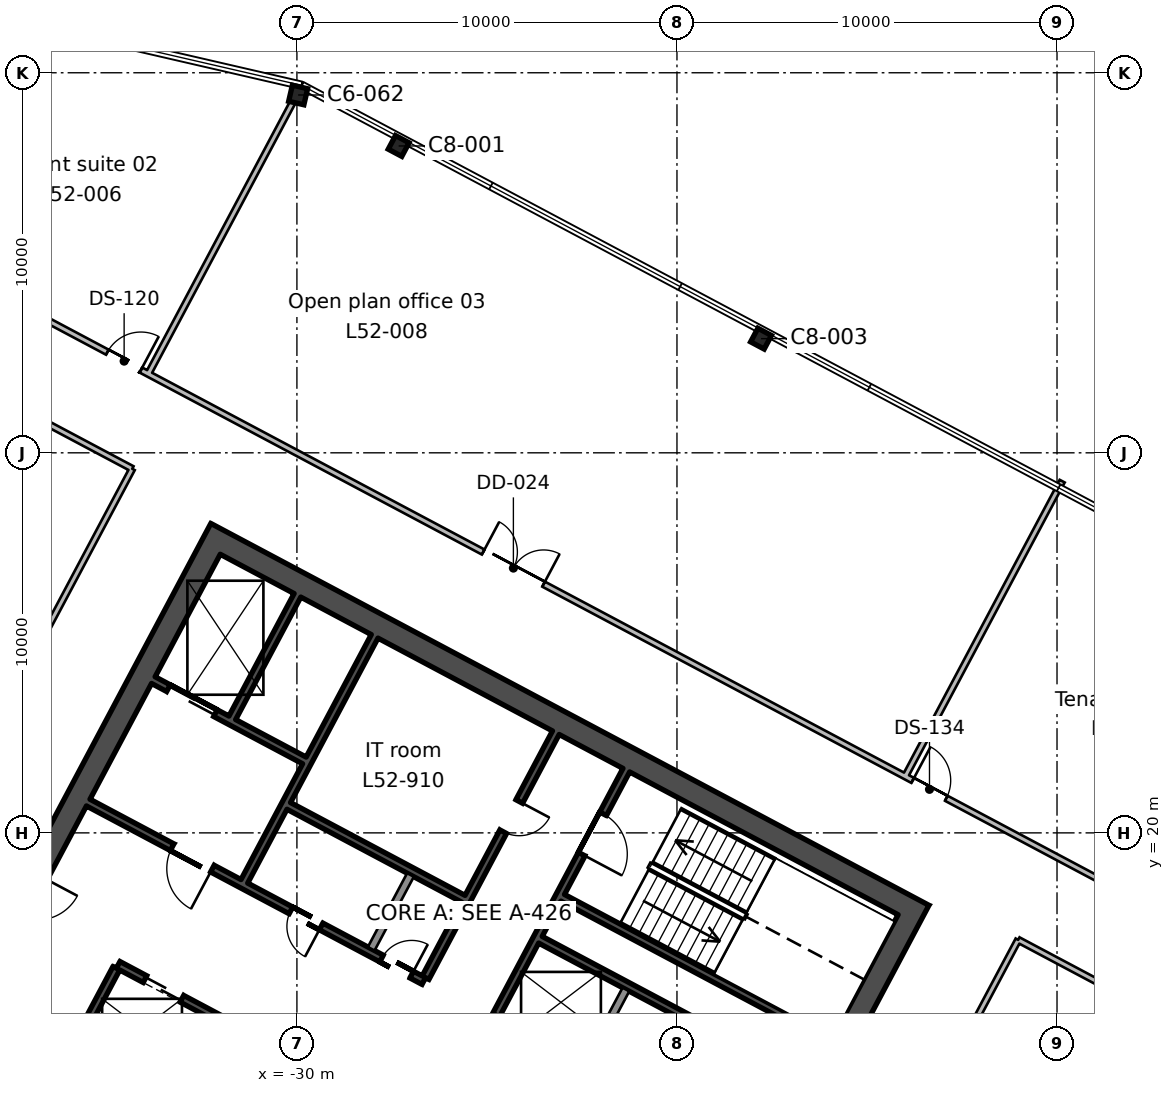
"""IFC4 building model, lengths in metres.
Left out: names, types, materials, properties, quantities, classifications, styles, units other than length and angle.
Written with IfcOpenShell. Run it as: python <this file> out.ifc"""

import sys

from ifc_helpers import new_model, si_unit, direction, frame, frame_2d, origin, origin_2d, place, context, subcontext, project, spatial, rectangle, i_section, extrude, element, fill, save


model = new_model("IFC4")
c1 = context("Model", 3, precision=1e-05, world=origin(), true_north=direction((0.0, 1.0)))
c2 = subcontext(c1, "Body", "Model", "MODEL_VIEW")
j1 = project(units=[si_unit("LENGTHUNIT", "METRE"), si_unit("PLANEANGLEUNIT", "RADIAN")], contexts=[c1])
p1 = place(None, origin())
s1 = spatial("IfcSite", under=j1, at=p1, CompositionType="ELEMENT")
p2 = place(p1, origin())
s2 = spatial("IfcBuilding", under=s1, at=p2, CompositionType="ELEMENT")
p3 = place(p2, frame((0.0, 0.0, 236.4)))
s3 = spatial("IfcBuildingStorey", under=s2, at=p3, CompositionType="ELEMENT", Elevation=236.4)
for number, where, z_axis, x_axis in (
    (1, (-17.788, 33.004, 0.0), (0.0, 0.0, 1.0), (-0.883, 0.469, 0.0)),
    (2, (-27.323, 38.074, 0.0), (0.0, 0.0, 1.0), (-0.883, 0.469, 0.0)),
):
    element("IfcColumn", number, at=place(p3, frame(where, z_axis=z_axis, x_axis=x_axis)), inside=s3, PredefinedType="COLUMN", context=c2, shape_type="SweptSolid", body=[
        extrude(i_section(OverallWidth=0.404, OverallDepth=0.406, WebThickness=0.027, FlangeThickness=0.044, FilletRadius=0.015, at=origin_2d()), origin(), (0.0, 0.0, 1.0), 3.9),
    ])
p4 = place(p3, frame((-29.968, 39.415, 0.0), z_axis=(0.0, 0.0, 1.0), x_axis=(-0.974370064785, 0.224951054344, 0.0)))
e3 = element("IfcColumn", 3, at=p4, inside=s3, PredefinedType="COLUMN", context=c2, shape_type="SweptSolid", body=[
    extrude(i_section(OverallWidth=0.412, OverallDepth=0.434, WebThickness=0.036, FlangeThickness=0.057, FilletRadius=0.015, at=origin_2d()), origin(), (0.0, 0.0, 1.0), 3.9),
])
p5 = place(p3, frame((-13.635, 18.236, 0.0), z_axis=(0.0, 0.0, 1.0), x_axis=(-0.469478769487, -0.88294376095, 0.0)))
e4 = element("IfcWall", 4, at=p5, inside=s3, PredefinedType="SHEAR", context=c2, shape_type="SweptSolid", body=[
    extrude(rectangle(XDim=19.4, YDim=0.6, at=frame_2d((9.7, 0.0))), origin(), (0.0, 0.0, 1.0), 3.9),
])
p6 = place(p5, frame((6.7, 0.0, 0.0)))
e5 = element("IfcOpeningElement", 5, at=p6, cuts=e4, PredefinedType="OPENING", context=c2, shape_type="SweptSolid", body=[
    extrude(rectangle(XDim=2.4, YDim=2.4, at=frame_2d((1.2, 1.2))), frame((0.0, 0.31, 0.0), z_axis=(0.0, -1.0, 0.0), x_axis=(1.0, 0.0, 0.0)), (0.0, 0.0, 1.0), 0.62),
])
p7 = place(p3, frame((-32.0, 28.001, 0.0), z_axis=(0.0, 0.0, 1.0), x_axis=(-0.469468958625, -0.882948977511, 0.0)))
e6 = element("IfcWall", 6, at=p7, inside=s3, PredefinedType="SHEAR", context=c2, shape_type="SweptSolid", body=[
    extrude(rectangle(XDim=19.4, YDim=0.6, at=frame_2d((9.7, 0.0))), origin(), (0.0, 0.0, 1.0), 3.9),
])
p8 = place(p7, frame((10.3, 0.0, 0.0)))
e7 = element("IfcOpeningElement", 7, at=p8, cuts=e6, PredefinedType="OPENING", context=c2, shape_type="SweptSolid", body=[
    extrude(rectangle(XDim=2.4, YDim=2.4, at=frame_2d((1.2, 1.2))), frame((0.0, 0.31, 0.0), z_axis=(0.0, -1.0, 0.0), x_axis=(1.0, 0.0, 0.0)), (0.0, 0.0, 1.0), 0.62),
])
p9 = place(p3, frame((-14.041, 18.112, 0.0), z_axis=(0.0, 0.0, 1.0), x_axis=(-0.882947755831, 0.46947125628, 0.0)))
e8 = element("IfcWall", 8, at=p9, inside=s3, PredefinedType="SHEAR", context=c2, shape_type="SweptSolid", body=[
    extrude(rectangle(XDim=20.2, YDim=0.6, at=frame_2d((10.1, 0.0))), origin(), (0.0, 0.0, 1.0), 3.9),
])
p10 = place(p3, frame((-21.344, 15.879, 0.0), z_axis=(0.0, 0.0, 1.0), x_axis=(-0.4694473164, -0.882960484464, 0.0)))
e9 = element("IfcWall", 9, at=p10, inside=s3, PredefinedType="SOLIDWALL", context=c2, shape_type="SweptSolid", body=[
    extrude(rectangle(XDim=2.2, YDim=0.2, at=frame_2d((1.1, 0.0))), origin(), (0.0, 0.0, 1.0), 3.9),
])
p11 = place(p3, frame((-21.333, 21.649, 0.0), z_axis=(0.0, 0.0, 1.0), x_axis=(-0.469494272526, -0.882935517501, 0.0)))
e10 = element("IfcWall", 10, at=p11, inside=s3, PredefinedType="SHEAR", context=c2, shape_type="SweptSolid", body=[
    extrude(rectangle(XDim=7.3, YDim=0.2, at=frame_2d((3.65, 0.0))), origin(), (0.0, 0.0, 1.0), 3.9),
])
p12 = place(p11, frame((1.3, 0.0, 0.0)))
e11 = element("IfcOpeningElement", 11, at=p12, cuts=e10, PredefinedType="OPENING", context=c2, shape_type="SweptSolid", body=[
    extrude(rectangle(XDim=1.2, YDim=2.1, at=frame_2d((0.6, 1.05))), frame((0.0, 0.11, 0.0), z_axis=(0.0, -1.0, 0.0), x_axis=(1.0, 0.0, 0.0)), (0.0, 0.0, 1.0), 0.22),
])
p13 = place(p3, frame((-23.188, 22.635, 0.0), z_axis=(0.0, 0.0, 1.0), x_axis=(-0.469454336211, -0.882956752176, 0.0)))
e12 = element("IfcWall", 12, at=p13, inside=s3, PredefinedType="SHEAR", context=c2, shape_type="SweptSolid", body=[
    extrude(rectangle(XDim=7.3, YDim=0.2, at=frame_2d((3.65, 0.0))), origin(), (0.0, 0.0, 1.0), 3.9),
])
p14 = place(p13, frame((2.05, 0.0, 0.0)))
e13 = element("IfcOpeningElement", 13, at=p14, cuts=e12, PredefinedType="OPENING", context=c2, shape_type="SweptSolid", body=[
    extrude(rectangle(XDim=0.9, YDim=2.1, at=frame_2d((0.45, 1.05))), frame((0.0, 0.11, 0.0), z_axis=(0.0, -1.0, 0.0), x_axis=(1.0, 0.0, 0.0)), (0.0, 0.0, 1.0), 0.22),
])
p15 = place(p3, frame((-27.012, 18.893, 0.0), z_axis=(0.0, 0.0, 1.0), x_axis=(-0.4694473164, -0.882960484464, 0.0)))
e14 = element("IfcWall", 14, at=p15, inside=s3, PredefinedType="SOLIDWALL", context=c2, shape_type="SweptSolid", body=[
    extrude(rectangle(XDim=2.2, YDim=0.2, at=frame_2d((1.1, 0.0))), origin(), (0.0, 0.0, 1.0), 3.9),
])
p16 = place(p3, frame((-27.955, 25.171, 0.0), z_axis=(0.0, 0.0, 1.0), x_axis=(-0.469480409012, -0.88294288918, 0.0)))
e15 = element("IfcWall", 15, at=p16, inside=s3, PredefinedType="SHEAR", context=c2, shape_type="SweptSolid", body=[
    extrude(rectangle(XDim=7.3, YDim=0.2, at=frame_2d((3.65, 0.0))), origin(), (0.0, 0.0, 1.0), 3.9),
])
p17 = place(p3, frame((-34.75, 16.438, 0.0), z_axis=(0.0, 0.0, 1.0), x_axis=(-0.469401318492, -0.882984938828, 0.0)))
e16 = element("IfcWall", 16, at=p17, inside=s3, PredefinedType="SHEAR", context=c2, shape_type="SweptSolid", body=[
    extrude(rectangle(XDim=2.2, YDim=0.2, at=frame_2d((1.1, 0.0))), origin(), (0.0, 0.0, 1.0), 3.9),
])
p18 = place(p3, frame((-29.986, 26.25, 0.0), z_axis=(0.0, 0.0, 1.0), x_axis=(-0.469494272526, -0.882935517501, 0.0)))
e17 = element("IfcWall", 17, at=p18, inside=s3, PredefinedType="SHEAR", context=c2, shape_type="SweptSolid", body=[
    extrude(rectangle(XDim=3.65, YDim=0.2, at=frame_2d((1.825, 0.0))), origin(), (0.0, 0.0, 1.0), 3.9),
])
p19 = place(p3, frame((-15.942, 14.536, 0.0), z_axis=(0.0, 0.0, 1.0), x_axis=(-0.882946947542, 0.469472776449, 0.0)))
e18 = element("IfcWall", 18, at=p19, inside=s3, PredefinedType="SHEAR", context=c2, shape_type="SweptSolid", body=[
    extrude(rectangle(XDim=8.0, YDim=0.2, at=frame_2d((4.0, 0.0))), origin(), (0.0, 0.0, 1.0), 3.9),
])
p20 = place(p3, frame((-29.804, 21.906, 0.0), z_axis=(0.0, 0.0, 1.0), x_axis=(-0.882960433586, 0.469447412093, 0.0)))
e19 = element("IfcWall", 19, at=p20, inside=s3, PredefinedType="SHEAR", context=c2, shape_type="SweptSolid", body=[
    extrude(rectangle(XDim=4.5, YDim=0.2, at=frame_2d((2.25, 0.0))), origin(), (0.0, 0.0, 1.0), 3.9),
])
p21 = place(p20, frame((2.65, 0.0, 0.0)))
e20 = element("IfcOpeningElement", 20, at=p21, cuts=e19, PredefinedType="OPENING", context=c2, shape_type="SweptSolid", body=[
    extrude(rectangle(XDim=1.4, YDim=2.4, at=frame_2d((0.7, 1.2))), frame((0.0, 0.11, 0.0), z_axis=(0.0, -1.0, 0.0), x_axis=(1.0, 0.0, 0.0)), (0.0, 0.0, 1.0), 0.22),
])
p22 = place(p3, frame((-16.529, 13.432, 0.0), z_axis=(0.0, 0.0, 1.0), x_axis=(-0.88295287151, 0.469461634952, 0.0)))
e21 = element("IfcWall", 21, at=p22, inside=s3, PredefinedType="SHEAR", context=c2, shape_type="SweptSolid", body=[
    extrude(rectangle(XDim=8.0, YDim=0.2, at=frame_2d((4.0, 0.0))), origin(), (0.0, 0.0, 1.0), 3.9),
])
p23 = place(p3, frame((-25.623, 18.268, 0.0), z_axis=(0.0, 0.0, 1.0), x_axis=(-0.882953967957, 0.469459572775, 0.0)))
e22 = element("IfcWall", 22, at=p23, inside=s3, PredefinedType="SHEAR", context=c2, shape_type="SweptSolid", body=[
    extrude(rectangle(XDim=5.2, YDim=0.2, at=frame_2d((2.6, 0.0))), origin(), (0.0, 0.0, 1.0), 3.9),
])
p24 = place(p3, frame((-26.662, 16.102, 0.0), z_axis=(0.0, 0.0, 1.0), x_axis=(-0.882940221191, 0.469485426614, 0.0)))
e23 = element("IfcWall", 23, at=p24, inside=s3, PredefinedType="SHEAR", context=c2, shape_type="SweptSolid", body=[
    extrude(rectangle(XDim=10.0, YDim=0.2, at=frame_2d((5.0, 0.0))), origin(), (0.0, 0.0, 1.0), 3.9),
])
p25 = place(p24, frame((6.3, 0.0, 0.0)))
e24 = element("IfcOpeningElement", 24, at=p25, cuts=e23, PredefinedType="OPENING", context=c2, shape_type="SweptSolid", body=[
    extrude(rectangle(XDim=1.2, YDim=2.1, at=frame_2d((0.6, 1.05))), frame((0.0, 0.11, 0.0), z_axis=(0.0, -1.0, 0.0), x_axis=(1.0, 0.0, 0.0)), (0.0, 0.0, 1.0), 0.22),
])
p26 = place(p24, frame((0.36, 0.0, 0.0)))
e25 = element("IfcOpeningElement", 25, at=p26, cuts=e23, PredefinedType="OPENING", context=c2, shape_type="SweptSolid", body=[
    extrude(rectangle(XDim=0.9, YDim=2.1, at=frame_2d((0.45, 1.05))), frame((0.0, 0.11, 0.0), z_axis=(0.0, -1.0, 0.0), x_axis=(1.0, 0.0, 0.0)), (0.0, 0.0, 1.0), 0.22),
])
p27 = place(p24, frame((3.06, 0.0, 0.0)))
e26 = element("IfcOpeningElement", 26, at=p27, cuts=e23, PredefinedType="OPENING", context=c2, shape_type="SweptSolid", body=[
    extrude(rectangle(XDim=0.9, YDim=2.1, at=frame_2d((0.45, 1.05))), frame((0.0, 0.11, 0.0), z_axis=(0.0, -1.0, 0.0), x_axis=(1.0, 0.0, 0.0)), (0.0, 0.0, 1.0), 0.22),
])
p28 = place(p3, frame((-29.935, 13.991, 0.0), z_axis=(0.0, 0.0, 1.0), x_axis=(-0.882952937579, 0.469461510692, 0.0)))
e27 = element("IfcWall", 27, at=p28, inside=s3, PredefinedType="SHEAR", context=c2, shape_type="SweptSolid", body=[
    extrude(rectangle(XDim=5.4, YDim=0.2, at=frame_2d((2.7, 0.0))), origin(), (0.0, 0.0, 1.0), 3.9),
])
p29 = place(p28, frame((0.8, 0.0, 0.0)))
e28 = element("IfcOpeningElement", 28, at=p29, cuts=e27, PredefinedType="OPENING", context=c2, shape_type="SweptSolid", body=[
    extrude(rectangle(XDim=1.1, YDim=2.1, at=frame_2d((0.55, 1.05))), frame((0.0, 0.11, 0.0), z_axis=(0.0, -1.0, 0.0), x_axis=(1.0, 0.0, 0.0)), (0.0, 0.0, 1.0), 0.22),
])
p30 = place(p28, frame((3.5, 0.0, 0.0)))
e29 = element("IfcOpeningElement", 29, at=p30, cuts=e27, PredefinedType="OPENING", context=c2, shape_type="SweptSolid", body=[
    extrude(rectangle(XDim=1.1, YDim=2.1, at=frame_2d((0.55, 1.05))), frame((0.0, 0.11, 0.0), z_axis=(0.0, -1.0, 0.0), x_axis=(1.0, 0.0, 0.0)), (0.0, 0.0, 1.0), 0.22),
])
p31 = place(p3, frame((-31.15, 11.919, 0.0), z_axis=(0.0, 0.0, 1.0), x_axis=(-0.882940221191, 0.469485426614, 0.0)))
e30 = element("IfcWall", 30, at=p31, inside=s3, PredefinedType="SHEAR", context=c2, shape_type="SweptSolid", body=[
    extrude(rectangle(XDim=8.0, YDim=0.2, at=frame_2d((4.0, 0.0))), origin(), (0.0, 0.0, 1.0), 3.9),
])
p32 = place(p3, frame((-40.0, 28.808, 0.0), z_axis=(0.0, 0.0, 1.0), x_axis=(0.731313661346, -0.682041295471, 0.0)))
e31 = element("IfcWall", 31, at=p32, inside=s3, PredefinedType="PARTITIONING", context=c2, shape_type="SweptSolid", body=[
    extrude(rectangle(XDim=4.806, YDim=0.15, at=frame_2d((2.403, 0.0))), origin(), (0.0, 0.0, 1.0), 3.54),
])
p33 = place(p3, frame((-41.769, 15.592, 0.0), z_axis=(0.0, 0.0, 1.0), x_axis=(0.469444027343, 0.882962233163, 0.0)))
e32 = element("IfcWall", 32, at=p33, inside=s3, PredefinedType="PARTITIONING", context=c2, shape_type="SweptSolid", body=[
    extrude(rectangle(XDim=15.842, YDim=0.15, at=frame_2d((7.921, 0.0))), origin(), (0.0, 0.0, 1.0), 3.54),
])
p34 = place(p33, frame((7.05, 0.0, 0.0)))
e33 = element("IfcOpeningElement", 33, at=p34, cuts=e32, PredefinedType="OPENING", context=c2, shape_type="SweptSolid", body=[
    extrude(rectangle(XDim=1.8, YDim=2.1, at=frame_2d((0.9, 1.05))), frame((0.0, 0.085, 0.0), z_axis=(0.0, -1.0, 0.0), x_axis=(1.0, 0.0, 0.0)), (0.0, 0.0, 1.0), 0.17),
])
p35 = place(p3, frame((-34.332, 29.58, 0.0), z_axis=(0.0, 0.0, 1.0), x_axis=(-0.882939350293, 0.46948706447, 0.0)))
e34 = element("IfcWall", 34, at=p35, inside=s3, PredefinedType="PARTITIONING", context=c2, shape_type="SweptSolid", body=[
    extrude(rectangle(XDim=19.327, YDim=0.15, at=frame_2d((9.664, 0.0))), origin(), (0.0, 0.0, 1.0), 3.54),
])
p36 = place(p3, frame((-48.541, 39.854, 0.0), z_axis=(0.0, 0.0, 1.0), x_axis=(0.882945008423, -0.469476423372, 0.0)))
e35 = element("IfcWall", 35, at=p36, inside=s3, PredefinedType="PARTITIONING", context=c2, shape_type="SweptSolid", body=[
    extrude(rectangle(XDim=54.976, YDim=0.15, at=frame_2d((27.488, 0.0))), origin(), (0.0, 0.0, 1.0), 3.54),
])
p37 = place(p36, frame((39.35, 0.0, 0.0)))
e36 = element("IfcOpeningElement", 36, at=p37, cuts=e35, PredefinedType="OPENING", context=c2, shape_type="SweptSolid", body=[
    extrude(rectangle(XDim=1.0, YDim=2.1, at=frame_2d((0.5, 1.05))), frame((0.0, 0.085, 0.0), z_axis=(0.0, -1.0, 0.0), x_axis=(1.0, 0.0, 0.0)), (0.0, 0.0, 1.0), 0.17),
])
p38 = place(p36, frame((26.55, 0.0, 0.0)))
e37 = element("IfcOpeningElement", 37, at=p38, cuts=e35, PredefinedType="OPENING", context=c2, shape_type="SweptSolid", body=[
    extrude(rectangle(XDim=1.8, YDim=2.1, at=frame_2d((0.9, 1.05))), frame((0.0, 0.085, 0.0), z_axis=(0.0, -1.0, 0.0), x_axis=(1.0, 0.0, 0.0)), (0.0, 0.0, 1.0), 0.17),
])
p39 = place(p36, frame((15.35, 0.0, 0.0)))
e38 = element("IfcOpeningElement", 38, at=p39, cuts=e35, PredefinedType="OPENING", context=c2, shape_type="SweptSolid", body=[
    extrude(rectangle(XDim=1.0, YDim=2.1, at=frame_2d((0.5, 1.05))), frame((0.0, 0.085, 0.0), z_axis=(0.0, -1.0, 0.0), x_axis=(1.0, 0.0, 0.0)), (0.0, 0.0, 1.0), 0.17),
])
p40 = place(p3, frame((-30.109, 39.225, 0.0), z_axis=(0.0, 0.0, 1.0), x_axis=(-0.469490973279, -0.882937271843, 0.0)))
e39 = element("IfcWall", 39, at=p40, inside=s3, PredefinedType="PARTITIONING", context=c2, shape_type="SweptSolid", body=[
    extrude(rectangle(XDim=8.098, YDim=0.15, at=frame_2d((4.049, 0.0))), origin(), (0.0, 0.0, 1.0), 3.54),
])
p41 = place(p3, frame((-9.864, 29.255, 0.0), z_axis=(0.0, 0.0, 1.0), x_axis=(-0.469457446168, -0.882955098653, 0.0)))
e40 = element("IfcWall", 40, at=p41, inside=s3, PredefinedType="PARTITIONING", context=c2, shape_type="SweptSolid", body=[
    extrude(rectangle(XDim=8.8, YDim=0.15, at=frame_2d((4.4, 0.0))), origin(), (0.0, 0.0, 1.0), 3.54),
])
p42 = place(p3, frame((-20.411, -0.473, 0.0), z_axis=(0.0, 0.0, 1.0), x_axis=(0.469451816494, 0.882958091865, 0.0)))
e41 = element("IfcWall", 41, at=p42, inside=s3, PredefinedType="PARTITIONING", context=c2, shape_type="SweptSolid", body=[
    extrude(rectangle(XDim=20.0, YDim=0.15, at=frame_2d((10.0, 0.0))), origin(), (0.0, 0.0, 1.0), 3.54),
])
p43 = place(p42, frame((9.45, 0.0, 0.0)))
e42 = element("IfcOpeningElement", 42, at=p43, cuts=e41, PredefinedType="OPENING", context=c2, shape_type="SweptSolid", body=[
    extrude(rectangle(XDim=1.0, YDim=2.1, at=frame_2d((0.5, 1.05))), frame((0.0, 0.085, 0.0), z_axis=(0.0, -1.0, 0.0), x_axis=(1.0, 0.0, 0.0)), (0.0, 0.0, 1.0), 0.17),
])
p44 = place(p3, frame((-11.022, 17.186, 0.0), z_axis=(0.0, 0.0, 1.0), x_axis=(0.882967947403, -0.469433279453, 0.0)))
e43 = element("IfcWall", 43, at=p44, inside=s3, PredefinedType="PARTITIONING", context=c2, shape_type="SweptSolid", body=[
    extrude(rectangle(XDim=7.639, YDim=0.15, at=frame_2d((3.819, 0.0))), origin(), (0.0, 0.0, 1.0), 3.54),
])
p45 = place(p25, origin())
e44 = element("IfcDoor", 44, at=p45, inside=s3, OperationType="SINGLE_SWING_LEFT", PredefinedType="DOOR", context=c2, shape_type="SweptSolid", body=[
    extrude(rectangle(XDim=1.2, YDim=2.1, at=frame_2d((0.6, 1.05))), frame((0.0, 0.025, 0.0), z_axis=(0.0, -1.0, 0.0), x_axis=(1.0, 0.0, 0.0)), (0.0, 0.0, 1.0), 0.05),
])
fill(e24, e44)
p46 = place(p12, origin())
e45 = element("IfcDoor", 45, at=p46, inside=s3, OperationType="SINGLE_SWING_RIGHT", PredefinedType="DOOR", context=c2, shape_type="SweptSolid", body=[
    extrude(rectangle(XDim=1.2, YDim=2.1, at=frame_2d((0.6, 1.05))), frame((0.0, 0.025, 0.0), z_axis=(0.0, -1.0, 0.0), x_axis=(1.0, 0.0, 0.0)), (0.0, 0.0, 1.0), 0.05),
])
fill(e11, e45)
p47 = place(p26, frame((0.9, 0.0, 0.0), z_axis=(0.0, 0.0, 1.0), x_axis=(-1.0, 0.0, 0.0)))
e46 = element("IfcDoor", 46, at=p47, inside=s3, OperationType="SINGLE_SWING_RIGHT", PredefinedType="DOOR", context=c2, shape_type="SweptSolid", body=[
    extrude(rectangle(XDim=0.9, YDim=2.1, at=frame_2d((0.45, 1.05))), frame((0.0, 0.025, 0.0), z_axis=(0.0, -1.0, 0.0), x_axis=(1.0, 0.0, 0.0)), (0.0, 0.0, 1.0), 0.05),
])
fill(e25, e46)
p48 = place(p27, origin())
e47 = element("IfcDoor", 47, at=p48, inside=s3, OperationType="SINGLE_SWING_LEFT", PredefinedType="DOOR", context=c2, shape_type="SweptSolid", body=[
    extrude(rectangle(XDim=0.9, YDim=2.1, at=frame_2d((0.45, 1.05))), frame((0.0, 0.025, 0.0), z_axis=(0.0, -1.0, 0.0), x_axis=(1.0, 0.0, 0.0)), (0.0, 0.0, 1.0), 0.05),
])
fill(e26, e47)
p49 = place(p30, origin())
e48 = element("IfcDoor", 48, at=p49, inside=s3, OperationType="DOUBLE_DOOR_SLIDING", PredefinedType="DOOR", context=c2, shape_type="SweptSolid", body=[
    extrude(rectangle(XDim=1.1, YDim=2.1, at=frame_2d((0.55, 1.05))), frame((0.0, 0.025, 0.0), z_axis=(0.0, -1.0, 0.0), x_axis=(1.0, 0.0, 0.0)), (0.0, 0.0, 1.0), 0.05),
])
fill(e29, e48)
p50 = place(p21, origin())
e49 = element("IfcDoor", 49, at=p50, inside=s3, OperationType="DOUBLE_DOOR_SLIDING", PredefinedType="DOOR", context=c2, shape_type="SweptSolid", body=[
    extrude(rectangle(XDim=1.4, YDim=2.4, at=frame_2d((0.7, 1.2))), frame((0.0, 0.025, 0.0), z_axis=(0.0, -1.0, 0.0), x_axis=(1.0, 0.0, 0.0)), (0.0, 0.0, 1.0), 0.05),
])
fill(e20, e49)
p51 = place(p14, origin())
e50 = element("IfcDoor", 50, at=p51, inside=s3, OperationType="SINGLE_SWING_LEFT", PredefinedType="DOOR", context=c2, shape_type="SweptSolid", body=[
    extrude(rectangle(XDim=0.9, YDim=2.1, at=frame_2d((0.45, 1.05))), frame((0.0, 0.025, 0.0), z_axis=(0.0, -1.0, 0.0), x_axis=(1.0, 0.0, 0.0)), (0.0, 0.0, 1.0), 0.05),
])
fill(e13, e50)
p52 = place(p37, origin())
e51 = element("IfcDoor", 51, at=p52, inside=s3, OperationType="SINGLE_SWING_LEFT", PredefinedType="DOOR", context=c2, shape_type="SweptSolid", body=[
    extrude(rectangle(XDim=1.0, YDim=2.1, at=frame_2d((0.5, 1.05))), frame((0.0, 0.025, 0.0), z_axis=(0.0, -1.0, 0.0), x_axis=(1.0, 0.0, 0.0)), (0.0, 0.0, 1.0), 0.05),
])
fill(e36, e51)
p53 = place(p38, origin())
e52 = element("IfcDoor", 52, at=p53, inside=s3, OperationType="DOUBLE_DOOR_SINGLE_SWING", PredefinedType="DOOR", context=c2, shape_type="SweptSolid", body=[
    extrude(rectangle(XDim=1.8, YDim=2.1, at=frame_2d((0.9, 1.05))), frame((0.0, 0.025, 0.0), z_axis=(0.0, -1.0, 0.0), x_axis=(1.0, 0.0, 0.0)), (0.0, 0.0, 1.0), 0.05),
])
fill(e37, e52)
p54 = place(p39, origin())
e53 = element("IfcDoor", 53, at=p54, inside=s3, OperationType="SINGLE_SWING_RIGHT", PredefinedType="DOOR", context=c2, shape_type="SweptSolid", body=[
    extrude(rectangle(XDim=1.0, YDim=2.1, at=frame_2d((0.5, 1.05))), frame((0.0, 0.025, 0.0), z_axis=(0.0, -1.0, 0.0), x_axis=(1.0, 0.0, 0.0)), (0.0, 0.0, 1.0), 0.05),
])
fill(e38, e53)
save(model, sys.argv[1])
